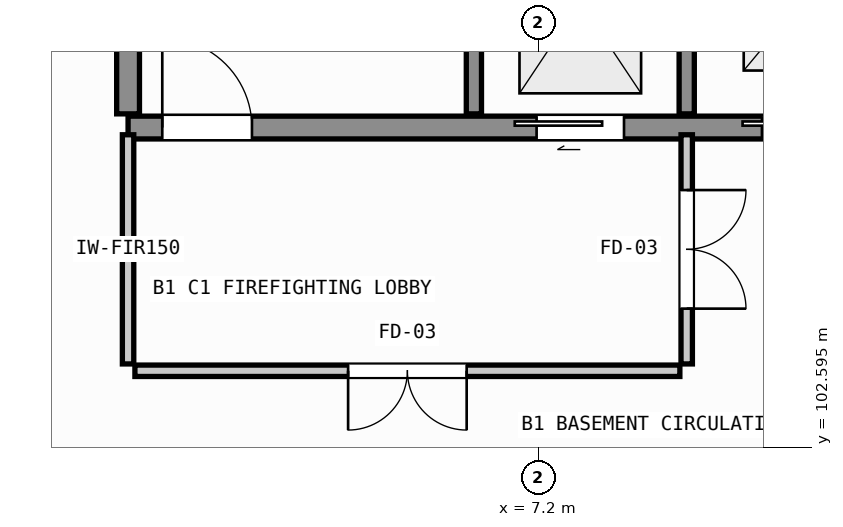
"""IFC4 building model, lengths in metres.
Left out: names, types, materials, properties, quantities, classifications, styles, units other than length and angle.
Written with IfcOpenShell. Run it as: python <this file> out.ifc"""

import sys

from ifc_helpers import new_model, si_unit, direction, frame, frame_2d, origin, place, context, subcontext, project, spatial, rectangle, extrude, element, fill, save


model = new_model("IFC4")
c1 = context("Model", 3, precision=1e-05, world=origin(), true_north=direction((0.0, 1.0)))
c2 = subcontext(c1, "Body", "Model", "MODEL_VIEW")
j1 = project(units=[si_unit("LENGTHUNIT", "METRE"), si_unit("PLANEANGLEUNIT", "RADIAN")], contexts=[c1])
p1 = place(None, origin())
s1 = spatial("IfcSite", under=j1, at=p1, CompositionType="ELEMENT")
p2 = place(p1, origin())
s2 = spatial("IfcBuilding", under=s1, at=p2, CompositionType="ELEMENT")
p3 = place(p2, frame((0.0, 0.0, -4.5)))
s3 = spatial("IfcBuildingStorey", under=s2, at=p3, CompositionType="ELEMENT", Elevation=-4.5)
p4 = place(p3, frame((1.8, 106.8, -0.5), z_axis=(0.0, 0.0, 1.0), x_axis=(1.0, 0.0, 0.0)))
e1 = element("IfcWall", 1, at=p4, inside=s3, PredefinedType="SHEAR", context=c2, shape_type="SweptSolid", body=[
    extrude(rectangle(XDim=10.8, YDim=0.3, at=frame_2d((5.4, 0.0))), origin(), (0.0, 0.0, 1.0), 5.0),
])
p5 = place(p4, frame((0.45, 0.0, 0.5)))
e2 = element("IfcOpeningElement", 2, at=p5, cuts=e1, PredefinedType="OPENING", context=c2, shape_type="SweptSolid", body=[
    extrude(rectangle(XDim=1.18, YDim=2.16, at=frame_2d((0.59, 1.08))), frame((0.0, 0.16, 0.0), z_axis=(0.0, -1.0, 0.0), x_axis=(1.0, 0.0, 0.0)), (0.0, 0.0, 1.0), 0.32),
])
p6 = place(p4, frame((5.375, 0.0, 0.5)))
e3 = element("IfcOpeningElement", 3, at=p6, cuts=e1, PredefinedType="OPENING", context=c2, shape_type="SweptSolid", body=[
    extrude(rectangle(XDim=1.15, YDim=2.15, at=frame_2d((0.575, 1.075))), frame((0.0, 0.16, 0.0), z_axis=(0.0, -1.0, 0.0), x_axis=(1.0, 0.0, 0.0)), (0.0, 0.0, 1.0), 0.32),
])
p7 = place(p4, frame((8.34, 0.0, 0.5)))
e4 = element("IfcOpeningElement", 4, at=p7, cuts=e1, PredefinedType="OPENING", context=c2, shape_type="SweptSolid", body=[
    extrude(rectangle(XDim=1.02, YDim=2.12, at=frame_2d((0.51, 1.06))), frame((0.0, 0.16, 0.0), z_axis=(0.0, -1.0, 0.0), x_axis=(1.0, 0.0, 0.0)), (0.0, 0.0, 1.0), 0.32),
])
p8 = place(p3, frame((1.8, 106.98, -0.5), z_axis=(0.0, 0.0, 1.0), x_axis=(0.0, 1.0, 0.0)))
e5 = element("IfcWall", 5, at=p8, inside=s3, PredefinedType="SHEAR", context=c2, shape_type="SweptSolid", body=[
    extrude(rectangle(XDim=6.24, YDim=0.3, at=frame_2d((3.12, 0.0))), origin(), (0.0, 0.0, 1.0), 5.0),
])
for number, where, z_axis, x_axis in (
    (6, (6.35, 106.98, -0.5), (0.0, 0.0, 1.0), (0.0, 1.0, 0.0)),
    (7, (9.15, 106.98, -0.5), (0.0, 0.0, 1.0), (0.0, 1.0, 0.0)),
):
    element("IfcWall", number, at=place(p3, frame(where, z_axis=z_axis, x_axis=x_axis)), inside=s3, PredefinedType="SHEAR", context=c2, shape_type="SweptSolid", body=[
        extrude(rectangle(XDim=3.15, YDim=0.2, at=frame_2d((1.575, 0.0))), origin(), (0.0, 0.0, 1.0), 5.0),
    ])
p9 = place(p3, frame((1.8, 103.69, 0.0), z_axis=(0.0, 0.0, 1.0), x_axis=(0.0, 1.0, 0.0)))
e8 = element("IfcWall", 8, at=p9, inside=s3, PredefinedType="PARTITIONING", context=c2, shape_type="SweptSolid", body=[
    extrude(rectangle(XDim=3.015, YDim=0.15, at=frame_2d((1.508, 0.0))), origin(), (0.0, 0.0, 1.0), 4.27),
])
p10 = place(p3, frame((9.15, 106.705, 0.0), z_axis=(0.0, 0.0, 1.0), x_axis=(0.0, -1.0, 0.0)))
e9 = element("IfcWall", 9, at=p10, inside=s3, PredefinedType="PARTITIONING", context=c2, shape_type="SweptSolid", body=[
    extrude(rectangle(XDim=3.015, YDim=0.15, at=frame_2d((1.508, 0.0))), origin(), (0.0, 0.0, 1.0), 4.27),
])
p11 = place(p10, frame((0.728, 0.0, 0.0)))
e10 = element("IfcOpeningElement", 10, at=p11, cuts=e9, PredefinedType="OPENING", context=c2, shape_type="SweptSolid", body=[
    extrude(rectangle(XDim=1.56, YDim=2.22, at=frame_2d((0.78, 1.11))), frame((0.0, 0.085, 0.0), z_axis=(0.0, -1.0, 0.0), x_axis=(1.0, 0.0, 0.0)), (0.0, 0.0, 1.0), 0.17),
])
p12 = place(p3, frame((9.06, 103.6, 0.0), z_axis=(0.0, 0.0, 1.0), x_axis=(-1.0, 0.0, 0.0)))
e11 = element("IfcWall", 11, at=p12, inside=s3, PredefinedType="PARTITIONING", context=c2, shape_type="SweptSolid", body=[
    extrude(rectangle(XDim=7.17, YDim=0.15, at=frame_2d((3.585, 0.0))), origin(), (0.0, 0.0, 1.0), 4.27),
])
p13 = place(p12, frame((2.805, 0.0, 0.0)))
e12 = element("IfcOpeningElement", 12, at=p13, cuts=e11, PredefinedType="OPENING", context=c2, shape_type="SweptSolid", body=[
    extrude(rectangle(XDim=1.56, YDim=2.22, at=frame_2d((0.78, 1.11))), frame((0.0, 0.085, 0.0), z_axis=(0.0, -1.0, 0.0), x_axis=(1.0, 0.0, 0.0)), (0.0, 0.0, 1.0), 0.17),
])
p14 = place(p5, origin())
e13 = element("IfcDoor", 13, at=p14, inside=s3, OperationType="SINGLE_SWING_LEFT", PredefinedType="DOOR", context=c2, shape_type="SweptSolid", body=[
    extrude(rectangle(XDim=1.18, YDim=2.16, at=frame_2d((0.59, 1.08))), frame((0.0, 0.025, 0.0), z_axis=(0.0, -1.0, 0.0), x_axis=(1.0, 0.0, 0.0)), (0.0, 0.0, 1.0), 0.05),
])
fill(e2, e13)
p15 = place(p6, origin())
e14 = element("IfcDoor", 14, at=p15, inside=s3, OperationType="DOUBLE_DOOR_SLIDING", PredefinedType="DOOR", context=c2, shape_type="SweptSolid", body=[
    extrude(rectangle(XDim=1.15, YDim=2.15, at=frame_2d((0.575, 1.075))), frame((0.0, 0.025, 0.0), z_axis=(0.0, -1.0, 0.0), x_axis=(1.0, 0.0, 0.0)), (0.0, 0.0, 1.0), 0.05),
])
fill(e3, e14)
p16 = place(p7, origin())
e15 = element("IfcDoor", 15, at=p16, inside=s3, OperationType="SLIDING_TO_LEFT", PredefinedType="DOOR", context=c2, shape_type="SweptSolid", body=[
    extrude(rectangle(XDim=1.02, YDim=2.12, at=frame_2d((0.51, 1.06))), frame((0.0, 0.025, 0.0), z_axis=(0.0, -1.0, 0.0), x_axis=(1.0, 0.0, 0.0)), (0.0, 0.0, 1.0), 0.05),
])
fill(e4, e15)
p17 = place(p11, origin())
e16 = element("IfcDoor", 16, at=p17, inside=s3, OperationType="DOUBLE_DOOR_SINGLE_SWING", PredefinedType="DOOR", context=c2, shape_type="SweptSolid", body=[
    extrude(rectangle(XDim=1.56, YDim=2.22, at=frame_2d((0.78, 1.11))), frame((0.0, 0.025, 0.0), z_axis=(0.0, -1.0, 0.0), x_axis=(1.0, 0.0, 0.0)), (0.0, 0.0, 1.0), 0.05),
])
fill(e10, e16)
p18 = place(p13, origin())
e17 = element("IfcDoor", 17, at=p18, inside=s3, OperationType="DOUBLE_DOOR_SINGLE_SWING", PredefinedType="DOOR", context=c2, shape_type="SweptSolid", body=[
    extrude(rectangle(XDim=1.56, YDim=2.22, at=frame_2d((0.78, 1.11))), frame((0.0, 0.025, 0.0), z_axis=(0.0, -1.0, 0.0), x_axis=(1.0, 0.0, 0.0)), (0.0, 0.0, 1.0), 0.05),
])
fill(e12, e17)
save(model, sys.argv[1])
